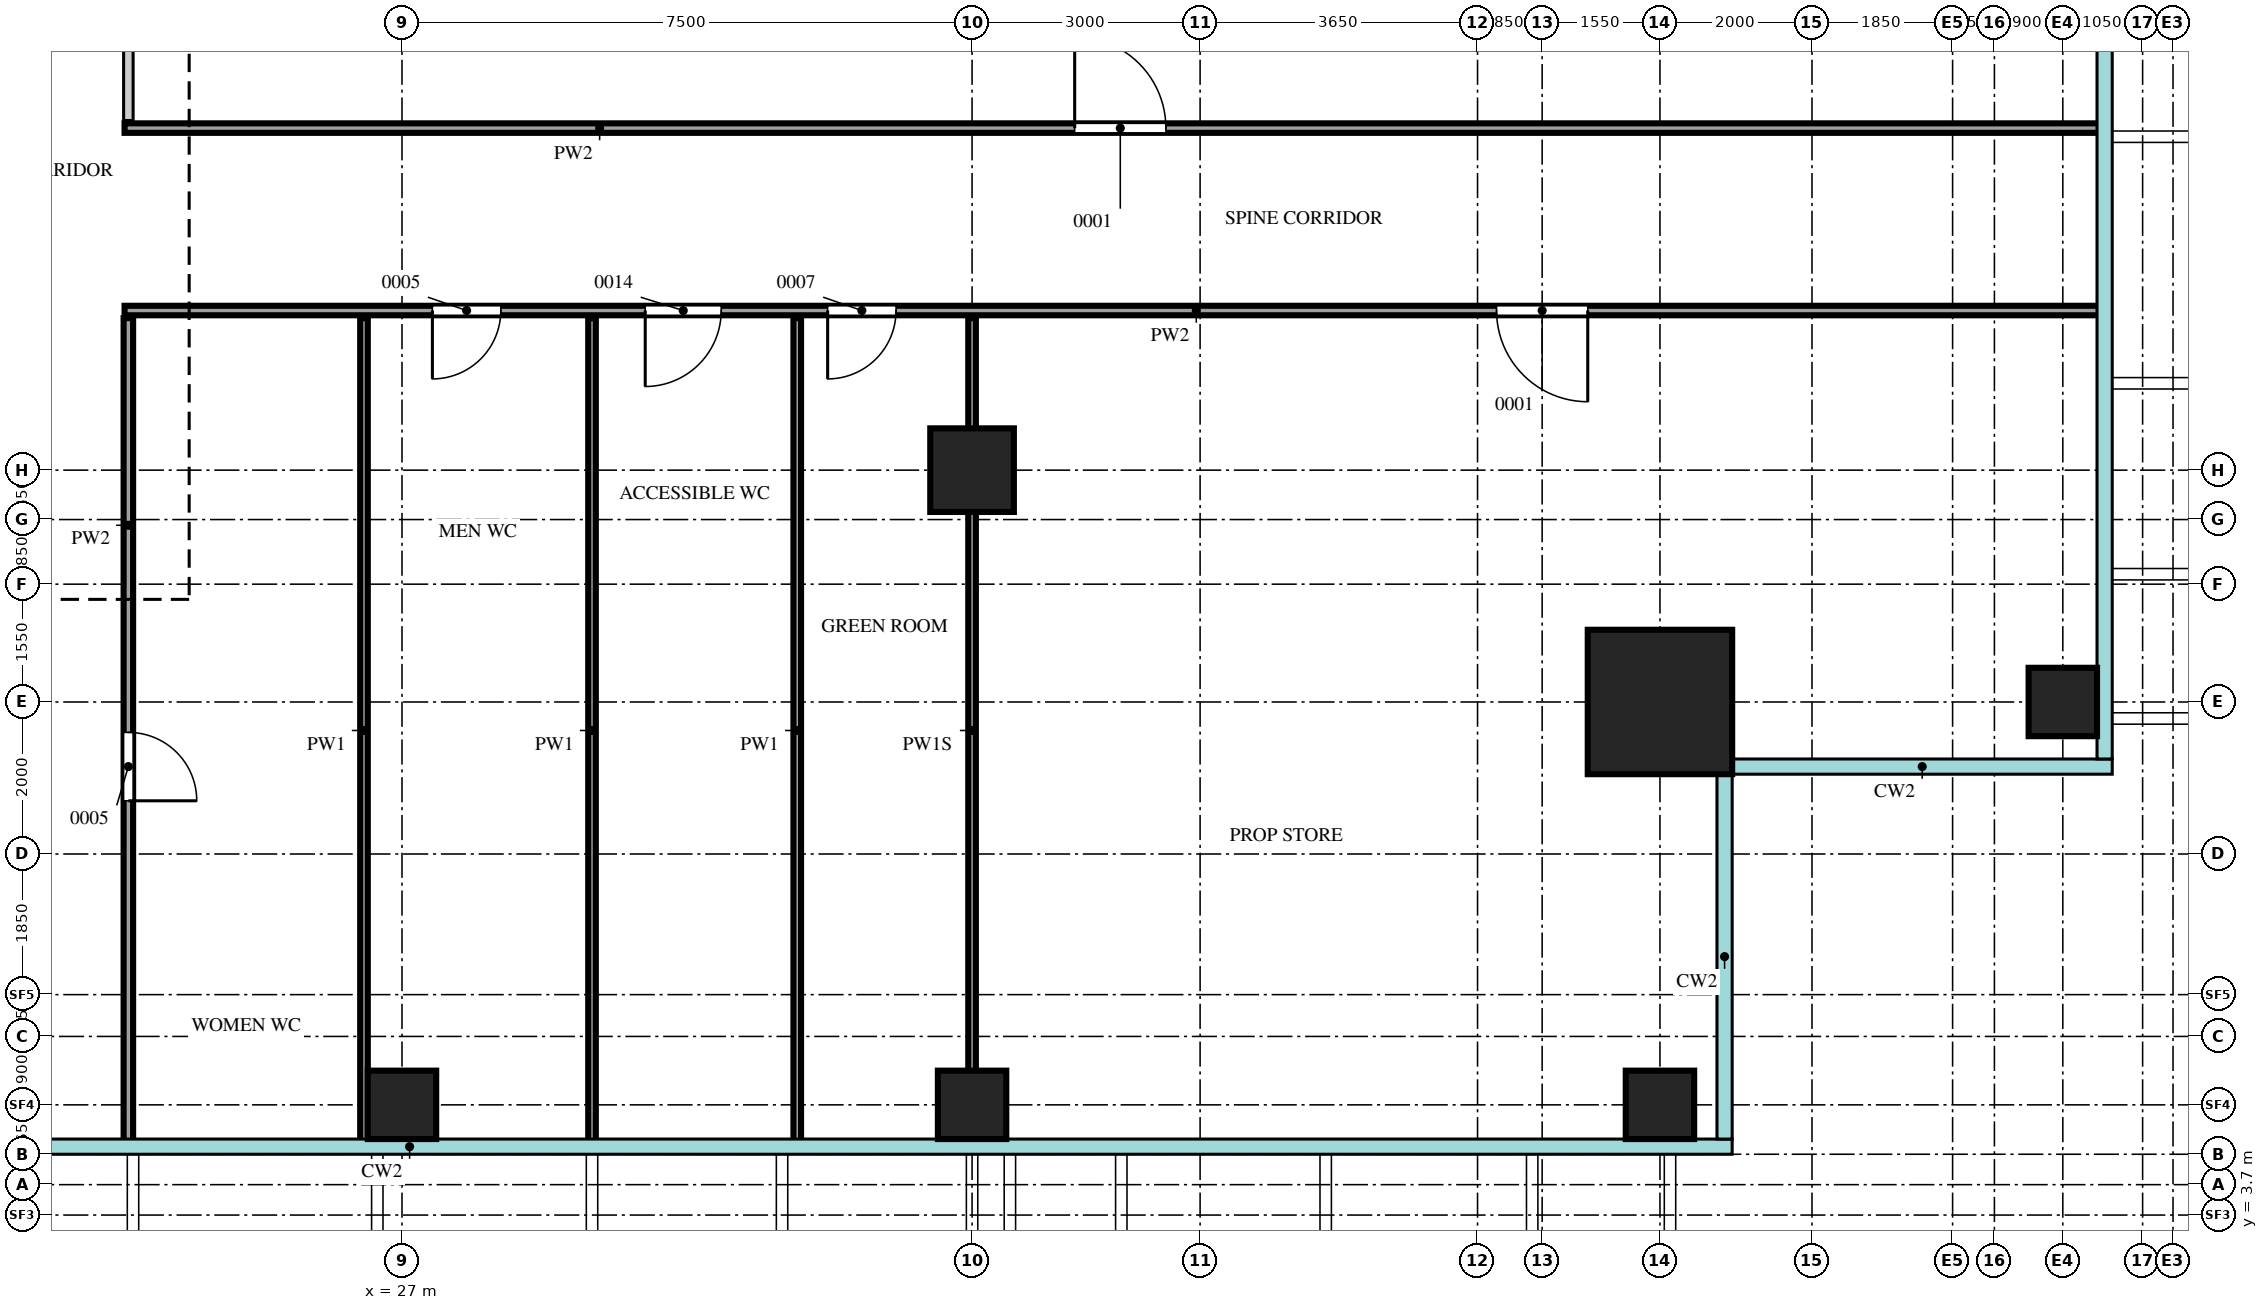
"""IFC4 building model, lengths in metres.
Left out: names, types, materials, properties, quantities, classifications, styles, units other than length and angle.
Written with IfcOpenShell. Run it as: python <this file> out.ifc"""

import sys

from ifc_helpers import new_model, si_unit, direction, frame, frame_2d, origin, origin_2d, place, context, subcontext, project, spatial, rectangle, extrude, source, transform, mapped, element, fill, save


model = new_model("IFC4")
c1 = context("Model", 3, precision=1e-05, world=origin(), true_north=direction((0.0, 1.0)))
c2 = subcontext(c1, "Body", "Model", "MODEL_VIEW")
j1 = project(units=[si_unit("LENGTHUNIT", "METRE"), si_unit("PLANEANGLEUNIT", "RADIAN")], contexts=[c1])
p1 = place(None, origin())
s1 = spatial("IfcSite", under=j1, at=p1, CompositionType="ELEMENT")
p2 = place(p1, origin())
s2 = spatial("IfcBuilding", under=s1, at=p2, CompositionType="ELEMENT")
p3 = place(p2, frame((0.0, 0.0, 246.2)))
s3 = spatial("IfcBuildingStorey", under=s2, at=p3, CompositionType="ELEMENT", Elevation=246.2)
m1 = source(origin(), c2, "Body", "SweptSolid", [
    extrude(rectangle(XDim=1.9, YDim=1.9, at=origin_2d()), origin(), (0.0, 0.0, 1.0), 4.0),
])
p4 = place(p3, frame((43.55, 10.45, 0.0), z_axis=(0.0, 0.0, 1.0), x_axis=(1.0, 0.0, 0.0)))
e1 = element("IfcColumn", 1, at=p4, inside=s3, PredefinedType="COLUMN", context=c2, shape_type="MappedRepresentation", body=[
    mapped(m1, transform((0.0, 0.0, 0.0))),
])
m2 = source(origin(), c2, "Body", "SweptSolid", [
    extrude(rectangle(XDim=0.9, YDim=0.9, at=origin_2d()), origin(), (0.0, 0.0, 1.0), 3.75),
])
for number, where, z_axis, x_axis in (
    (2, (27.0, 5.15, 0.0), (0.0, 0.0, 1.0), (1.0, 0.0, 0.0)),
    (3, (34.5, 5.15, 0.0), (0.0, 0.0, 1.0), (1.0, 0.0, 0.0)),
    (4, (43.55, 5.15, 0.0), (0.0, 0.0, 1.0), (1.0, 0.0, 0.0)),
    (5, (48.85, 10.45, 0.0), (0.0, 0.0, 1.0), (1.0, 0.0, 0.0)),
):
    element("IfcColumn", number, at=place(p3, frame(where, z_axis=z_axis, x_axis=x_axis)), inside=s3, PredefinedType="COLUMN", context=c2, shape_type="MappedRepresentation", body=[
        mapped(m2, transform((0.0, 0.0, 0.0))),
    ])
m3 = source(origin(), c2, "Body", "SweptSolid", [
    extrude(rectangle(XDim=1.1, YDim=1.1, at=origin_2d()), origin(), (0.0, 0.0, 1.0), 3.75),
])
p5 = place(p3, frame((34.5, 13.5, 0.0), z_axis=(0.0, 0.0, 1.0), x_axis=(1.0, 0.0, 0.0)))
e6 = element("IfcColumn", 6, at=p5, inside=s3, PredefinedType="COLUMN", context=c2, shape_type="MappedRepresentation", body=[
    mapped(m3, transform((0.0, 0.0, 0.0))),
])
m4 = source(origin(), c2, "Body", "SweptSolid", [
    extrude(rectangle(XDim=10.85, YDim=0.125, at=frame_2d((5.425, 0.0))), origin(), (0.0, 0.0, 1.0), 3.8),
])
p6 = place(p3, frame((23.4, 4.65, 0.0), z_axis=(0.0, 0.0, 1.0), x_axis=(0.0, 1.0, 0.0)))
e7 = element("IfcWall", 7, at=p6, inside=s3, PredefinedType="PARTITIONING", context=c2, shape_type="MappedRepresentation", body=[
    mapped(m4, transform((0.0, 0.0, 0.0))),
])
m5 = source(origin(), c2, "Body", "SweptSolid", [
    extrude(rectangle(XDim=0.9, YDim=2.1, at=frame_2d((0.45, 1.05))), frame((0.0, 0.073, 0.0), z_axis=(0.0, -1.0, 0.0), x_axis=(1.0, 0.0, 0.0)), (0.0, 0.0, 1.0), 0.145),
])
p7 = place(p6, frame((4.5, 0.0, 0.0)))
e8 = element("IfcOpeningElement", 8, at=p7, cuts=e7, PredefinedType="OPENING", context=c2, shape_type="MappedRepresentation", body=[
    mapped(m5, transform((0.0, 0.0, 0.0))),
])
m6 = source(origin(), c2, "Body", "SweptSolid", [
    extrude(rectangle(XDim=10.85, YDim=0.1, at=frame_2d((5.425, 0.0))), origin(), (0.0, 0.0, 1.0), 3.8),
])
for number, where, z_axis, x_axis in (
    (9, (26.5, 4.65, 0.0), (0.0, 0.0, 1.0), (0.0, 1.0, 0.0)),
    (10, (29.5, 4.65, 0.0), (0.0, 0.0, 1.0), (0.0, 1.0, 0.0)),
    (11, (32.2, 4.65, 0.0), (0.0, 0.0, 1.0), (0.0, 1.0, 0.0)),
):
    element("IfcWall", number, at=place(p3, frame(where, z_axis=z_axis, x_axis=x_axis)), inside=s3, PredefinedType="PARTITIONING", context=c2, shape_type="MappedRepresentation", body=[
        mapped(m6, transform((0.0, 0.0, 0.0))),
    ])
m7 = source(origin(), c2, "Body", "SweptSolid", [
    extrude(rectangle(XDim=10.85, YDim=0.1, at=frame_2d((5.425, 0.0))), origin(), (0.0, 0.0, 1.0), 3.35),
])
p8 = place(p3, frame((34.5, 4.65, 0.0), z_axis=(0.0, 0.0, 1.0), x_axis=(0.0, 1.0, 0.0)))
e12 = element("IfcWall", 12, at=p8, inside=s3, PredefinedType="PARTITIONING", context=c2, shape_type="MappedRepresentation", body=[
    mapped(m7, transform((0.0, 0.0, 0.0))),
])
m8 = source(origin(), c2, "Body", "SweptSolid", [
    extrude(rectangle(XDim=26.0, YDim=0.125, at=frame_2d((13.0, 0.0))), origin(), (0.0, 0.0, 1.0), 3.8),
])
p9 = place(p3, frame((23.35, 15.6, 0.0), z_axis=(0.0, 0.0, 1.0), x_axis=(1.0, 0.0, 0.0)))
e13 = element("IfcWall", 13, at=p9, inside=s3, PredefinedType="PARTITIONING", context=c2, shape_type="MappedRepresentation", body=[
    mapped(m8, transform((0.0, 0.0, 0.0))),
])
p10 = place(p9, frame((4.05, 0.0, 0.0)))
e14 = element("IfcOpeningElement", 14, at=p10, cuts=e13, PredefinedType="OPENING", context=c2, shape_type="MappedRepresentation", body=[
    mapped(m5, transform((0.0, 0.0, 0.0))),
])
m9 = source(origin(), c2, "Body", "SweptSolid", [
    extrude(rectangle(XDim=1.0, YDim=2.1, at=frame_2d((0.5, 1.05))), frame((0.0, 0.073, 0.0), z_axis=(0.0, -1.0, 0.0), x_axis=(1.0, 0.0, 0.0)), (0.0, 0.0, 1.0), 0.145),
])
p11 = place(p9, frame((6.85, 0.0, 0.0)))
e15 = element("IfcOpeningElement", 15, at=p11, cuts=e13, PredefinedType="OPENING", context=c2, shape_type="MappedRepresentation", body=[
    mapped(m9, transform((0.0, 0.0, 0.0))),
])
p12 = place(p9, frame((9.25, 0.0, 0.0)))
e16 = element("IfcOpeningElement", 16, at=p12, cuts=e13, PredefinedType="OPENING", context=c2, shape_type="MappedRepresentation", body=[
    mapped(m5, transform((0.0, 0.0, 0.0))),
])
m10 = source(origin(), c2, "Body", "SweptSolid", [
    extrude(rectangle(XDim=1.2, YDim=2.1, at=frame_2d((0.6, 1.05))), frame((0.0, 0.073, 0.0), z_axis=(0.0, -1.0, 0.0), x_axis=(1.0, 0.0, 0.0)), (0.0, 0.0, 1.0), 0.145),
])
p13 = place(p9, frame((18.05, 0.0, 0.0)))
e17 = element("IfcOpeningElement", 17, at=p13, cuts=e13, PredefinedType="OPENING", context=c2, shape_type="MappedRepresentation", body=[
    mapped(m10, transform((0.0, 0.0, 0.0))),
])
p14 = place(p3, frame((23.35, 18.0, 0.0), z_axis=(0.0, 0.0, 1.0), x_axis=(1.0, 0.0, 0.0)))
e18 = element("IfcWall", 18, at=p14, inside=s3, PredefinedType="PARTITIONING", context=c2, shape_type="MappedRepresentation", body=[
    mapped(m8, transform((0.0, 0.0, 0.0))),
])
p15 = place(p14, frame((12.5, 0.0, 0.0)))
e19 = element("IfcOpeningElement", 19, at=p15, cuts=e18, PredefinedType="OPENING", context=c2, shape_type="MappedRepresentation", body=[
    mapped(m10, transform((0.0, 0.0, 0.0))),
])
m11 = source(origin(), c2, "Body", "SweptSolid", [
    extrude(rectangle(XDim=20.8, YDim=0.125, at=frame_2d((10.4, 0.0))), origin(), (0.0, 0.0, 1.0), 3.8),
])
p16 = place(p3, frame((23.4, 18.1, 0.0), z_axis=(0.0, 0.0, 1.0), x_axis=(0.0, 1.0, 0.0)))
e20 = element("IfcWall", 20, at=p16, inside=s3, PredefinedType="PARTITIONING", context=c2, shape_type="MappedRepresentation", body=[
    mapped(m11, transform((0.0, 0.0, 0.0))),
])
p17 = place(p16, frame((12.05, 0.0, 0.0)))
e21 = element("IfcOpeningElement", 21, at=p17, cuts=e20, PredefinedType="OPENING", context=c2, shape_type="MappedRepresentation", body=[
    mapped(m10, transform((0.0, 0.0, 0.0))),
])
m12 = source(origin(), c2, "Body", "SweptSolid", [
    extrude(rectangle(XDim=0.9, YDim=2.1, at=frame_2d((0.45, 1.05))), frame((0.0, 0.025, 0.0), z_axis=(0.0, -1.0, 0.0), x_axis=(1.0, 0.0, 0.0)), (0.0, 0.0, 1.0), 0.05),
])
p18 = place(p7, origin())
e22 = element("IfcDoor", 22, at=p18, inside=s3, OperationType="SINGLE_SWING_LEFT", PredefinedType="DOOR", context=c2, shape_type="MappedRepresentation", body=[
    mapped(m12, transform((0.0, 0.0, 0.0))),
])
fill(e8, e22)
p19 = place(p10, origin())
e23 = element("IfcDoor", 23, at=p19, inside=s3, OperationType="SINGLE_SWING_LEFT", PredefinedType="DOOR", context=c2, shape_type="MappedRepresentation", body=[
    mapped(m12, transform((0.0, 0.0, 0.0))),
])
fill(e14, e23)
m13 = source(origin(), c2, "Body", "SweptSolid", [
    extrude(rectangle(XDim=1.0, YDim=2.1, at=frame_2d((0.5, 1.05))), frame((0.0, 0.025, 0.0), z_axis=(0.0, -1.0, 0.0), x_axis=(1.0, 0.0, 0.0)), (0.0, 0.0, 1.0), 0.05),
])
p20 = place(p11, origin())
e24 = element("IfcDoor", 24, at=p20, inside=s3, OperationType="SINGLE_SWING_LEFT", PredefinedType="DOOR", context=c2, shape_type="MappedRepresentation", body=[
    mapped(m13, transform((0.0, 0.0, 0.0))),
])
fill(e15, e24)
p21 = place(p12, origin())
e25 = element("IfcDoor", 25, at=p21, inside=s3, OperationType="SINGLE_SWING_LEFT", PredefinedType="DOOR", context=c2, shape_type="MappedRepresentation", body=[
    mapped(m12, transform((0.0, 0.0, 0.0))),
])
fill(e16, e25)
m14 = source(origin(), c2, "Body", "SweptSolid", [
    extrude(rectangle(XDim=1.2, YDim=2.1, at=frame_2d((0.6, 1.05))), frame((0.0, 0.025, 0.0), z_axis=(0.0, -1.0, 0.0), x_axis=(1.0, 0.0, 0.0)), (0.0, 0.0, 1.0), 0.05),
])
p22 = place(p13, origin())
e26 = element("IfcDoor", 26, at=p22, inside=s3, OperationType="SINGLE_SWING_RIGHT", PredefinedType="DOOR", context=c2, shape_type="MappedRepresentation", body=[
    mapped(m14, transform((0.0, 0.0, 0.0))),
])
fill(e17, e26)
p23 = place(p15, origin())
e27 = element("IfcDoor", 27, at=p23, inside=s3, OperationType="SINGLE_SWING_RIGHT", PredefinedType="DOOR", context=c2, shape_type="MappedRepresentation", body=[
    mapped(m14, transform((0.0, 0.0, 0.0))),
])
fill(e19, e27)
save(model, sys.argv[1])
